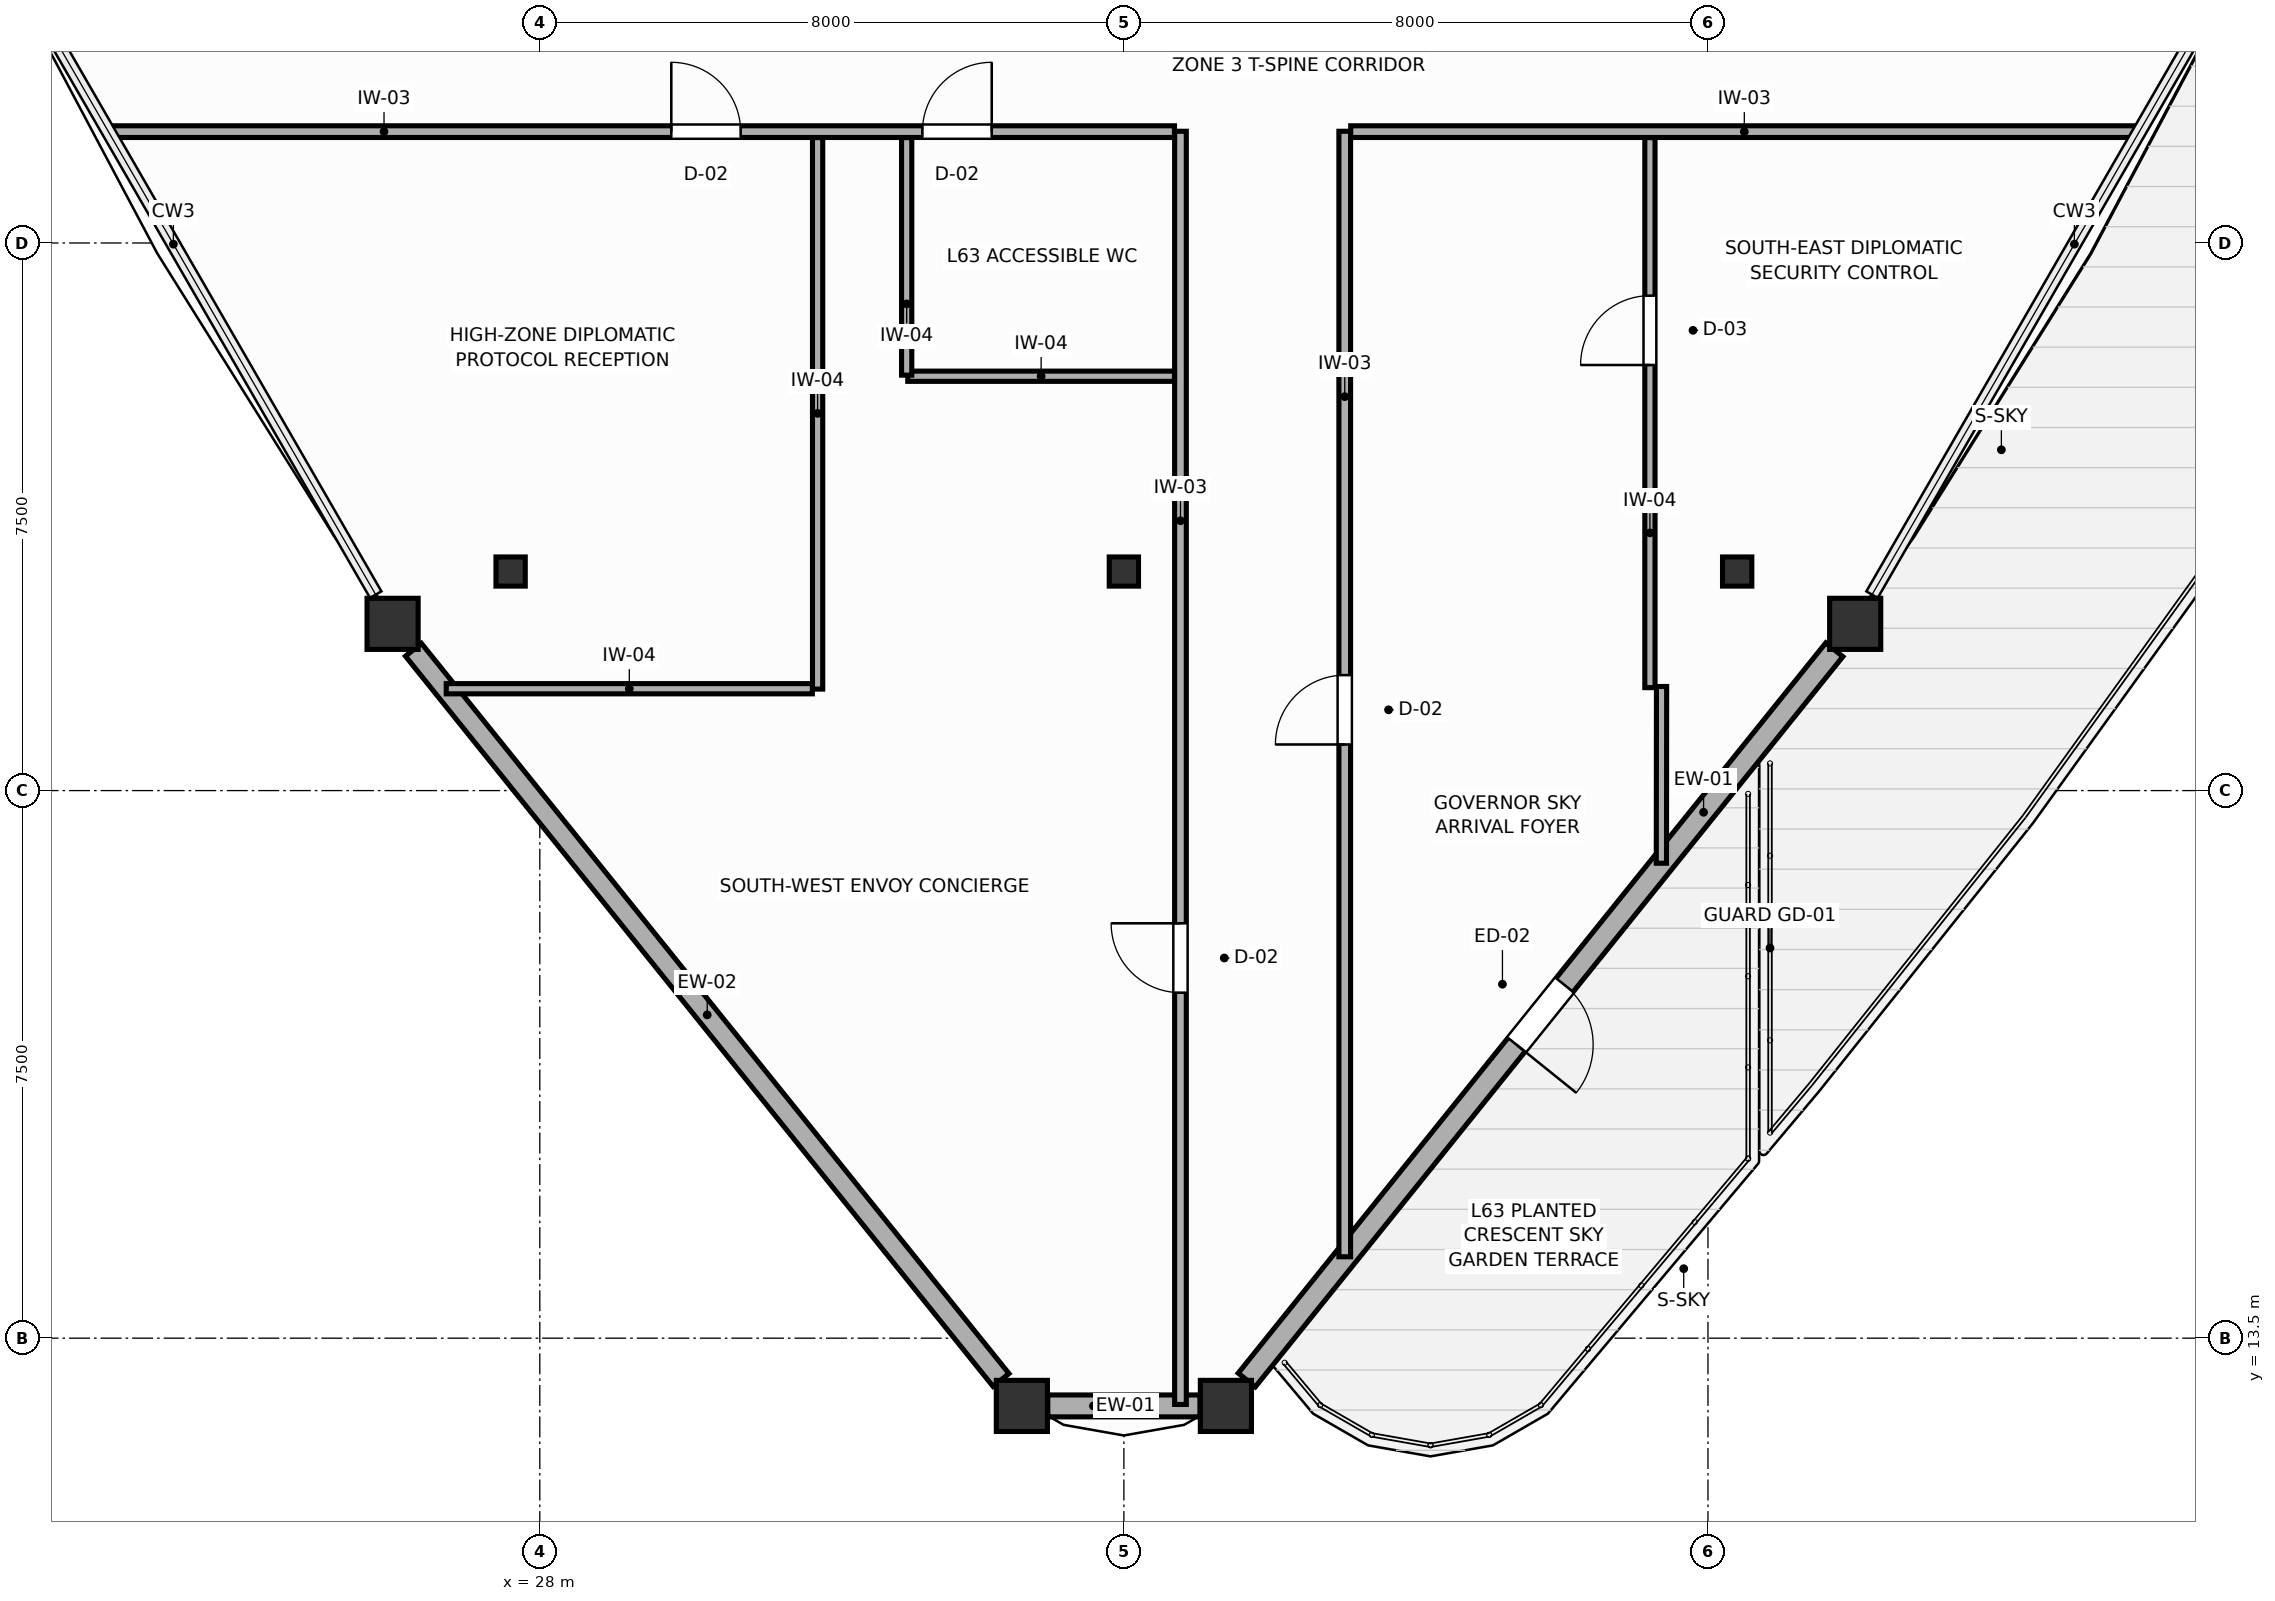
"""IFC4 building model, lengths in metres.
Left out: names, types, materials, properties, quantities, classifications, styles, units other than length and angle.
Written with IfcOpenShell. Run it as: python <this file> out.ifc"""

import sys

from ifc_helpers import new_model, si_unit, direction, frame, frame_2d, origin, origin_2d, place, context, subcontext, project, spatial, rectangle, i_section, extrude, source, transform, mapped, element, fill, save


model = new_model("IFC4")
c1 = context("Model", 3, precision=1e-05, world=origin(), true_north=direction((0.0, 1.0)))
c2 = subcontext(c1, "Body", "Model", "MODEL_VIEW")
j1 = project(units=[si_unit("LENGTHUNIT", "METRE"), si_unit("PLANEANGLEUNIT", "RADIAN")], contexts=[c1])
p1 = place(None, origin())
s1 = spatial("IfcSite", under=j1, at=p1, CompositionType="ELEMENT")
p2 = place(p1, origin())
s2 = spatial("IfcBuilding", under=s1, at=p2, CompositionType="ELEMENT")
p3 = place(p2, frame((0.0, 0.0, 243.0)))
s3 = spatial("IfcBuildingStorey", under=s2, at=p3, CompositionType="ELEMENT", Elevation=243.0)
m1 = source(origin(), c2, "Body", "SweptSolid", [
    extrude(i_section(OverallWidth=0.401, OverallDepth=0.399, WebThickness=0.022, FlangeThickness=0.036, FilletRadius=0.015, at=origin_2d()), origin(), (0.0, 0.0, 1.0), 3.6),
])
for number, where, z_axis, x_axis in (
    (1, (27.6, 24.0, 0.0), (0.0, 0.0, 1.0), (1.0, 0.0, 0.0)),
    (2, (44.4, 24.0, 0.0), (0.0, 0.0, 1.0), (1.0, 0.0, 0.0)),
    (3, (36.0, 24.0, 0.0), (0.0, 0.0, 1.0), (1.0, 0.0, 0.0)),
):
    element("IfcColumn", number, at=place(p3, frame(where, z_axis=z_axis, x_axis=x_axis)), inside=s3, PredefinedType="COLUMN", context=c2, shape_type="MappedRepresentation", body=[
        mapped(m1, transform((0.0, 0.0, 0.0), scale=1.0)),
    ])
m2 = source(origin(), c2, "Body", "SweptSolid", [
    extrude(rectangle(XDim=0.7, YDim=0.7, at=origin_2d()), origin(), (0.0, 0.0, 1.0), 3.6),
])
for number, where, z_axis, x_axis in (
    (4, (25.983, 23.284, 0.0), (0.0, 0.0, 1.0), (1.0, 0.0, 0.0)),
    (5, (34.603, 12.572, 0.0), (0.0, 0.0, 1.0), (1.0, 0.0, 0.0)),
    (6, (37.397, 12.572, 0.0), (0.0, 0.0, 1.0), (1.0, 0.0, 0.0)),
    (7, (46.017, 23.284, 0.0), (0.0, 0.0, 1.0), (1.0, 0.0, 0.0)),
):
    element("IfcColumn", number, at=place(p3, frame(where, z_axis=z_axis, x_axis=x_axis)), inside=s3, PredefinedType="COLUMN", context=c2, shape_type="MappedRepresentation", body=[
        mapped(m2, transform((0.0, 0.0, 0.0), scale=1.0)),
    ])
p4 = place(p3, frame((26.269, 22.929, 0.0), z_axis=(0.0, 0.0, 1.0), x_axis=(0.626898207352, -0.779101172903, 0.0)))
e8 = element("IfcWall", 8, at=p4, inside=s3, PredefinedType="SOLIDWALL", context=c2, shape_type="SweptSolid", body=[
    extrude(rectangle(XDim=12.837, YDim=0.28, at=frame_2d((6.418, 0.0))), origin(), (0.0, 0.0, 1.0), 3.08),
])
p5 = place(p3, frame((34.958, 12.572, 0.0), z_axis=(0.0, 0.0, 1.0), x_axis=(1.0, 0.0, 0.0)))
e9 = element("IfcWall", 9, at=p5, inside=s3, PredefinedType="SOLIDWALL", context=c2, shape_type="SweptSolid", body=[
    extrude(rectangle(XDim=2.085, YDim=0.3, at=frame_2d((1.042, 0.0))), origin(), (0.0, 0.0, 1.0), 3.08),
])
p6 = place(p3, frame((37.683, 12.927, 0.0), z_axis=(0.0, 0.0, 1.0), x_axis=(0.626898207352, 0.779101172903, 0.0)))
e10 = element("IfcWall", 10, at=p6, inside=s3, PredefinedType="SOLIDWALL", context=c2, shape_type="SweptSolid", body=[
    extrude(rectangle(XDim=12.837, YDim=0.3, at=frame_2d((6.418, 0.0))), origin(), (0.0, 0.0, 1.0), 3.05),
])
p7 = place(p6, frame((5.894, 0.0, 0.0)))
e11 = element("IfcOpeningElement", 11, at=p7, cuts=e10, PredefinedType="OPENING", context=c2, shape_type="SweptSolid", body=[
    extrude(rectangle(XDim=1.05, YDim=2.1, at=frame_2d((0.525, 1.05))), frame((0.0, 0.16, 0.0), z_axis=(0.0, -1.0, 0.0), x_axis=(1.0, 0.0, 0.0)), (0.0, 0.0, 1.0), 0.32),
])
p8 = place(p3, frame((36.775, 12.592, 0.0), z_axis=(0.0, 0.0, 1.0), x_axis=(0.0, 1.0, 0.0)))
e12 = element("IfcWall", 12, at=p8, inside=s3, PredefinedType="PARTITIONING", context=c2, shape_type="SweptSolid", body=[
    extrude(rectangle(XDim=17.438, YDim=0.16, at=frame_2d((8.719, 0.0))), origin(), (0.0, 0.0, 1.0), 3.41),
])
p9 = place(p8, frame((5.64, 0.0, 0.0)))
e13 = element("IfcOpeningElement", 13, at=p9, cuts=e12, PredefinedType="OPENING", context=c2, shape_type="SweptSolid", body=[
    extrude(rectangle(XDim=0.95, YDim=2.05, at=frame_2d((0.475, 1.025))), frame((0.0, 0.09, 0.0), z_axis=(0.0, -1.0, 0.0), x_axis=(1.0, 0.0, 0.0)), (0.0, 0.0, 1.0), 0.18),
])
p10 = place(p3, frame((39.025, 14.615, 0.0), z_axis=(0.0, 0.0, 1.0), x_axis=(0.0, 1.0, 0.0)))
e14 = element("IfcWall", 14, at=p10, inside=s3, PredefinedType="PARTITIONING", context=c2, shape_type="SweptSolid", body=[
    extrude(rectangle(XDim=15.415, YDim=0.16, at=frame_2d((7.708, 0.0))), origin(), (0.0, 0.0, 1.0), 3.41),
])
p11 = place(p10, frame((7.017, 0.0, 0.0)))
e15 = element("IfcOpeningElement", 15, at=p11, cuts=e14, PredefinedType="OPENING", context=c2, shape_type="SweptSolid", body=[
    extrude(rectangle(XDim=0.95, YDim=2.05, at=frame_2d((0.475, 1.025))), frame((0.0, 0.09, 0.0), z_axis=(0.0, -1.0, 0.0), x_axis=(1.0, 0.0, 0.0)), (0.0, 0.0, 1.0), 0.18),
])
p12 = place(p3, frame((22.111, 30.025, 0.0), z_axis=(0.0, 0.0, 1.0), x_axis=(1.0, 0.0, 0.0)))
e16 = element("IfcWall", 16, at=p12, inside=s3, PredefinedType="PARTITIONING", context=c2, shape_type="SweptSolid", body=[
    extrude(rectangle(XDim=14.582, YDim=0.16, at=frame_2d((7.291, 0.0))), origin(), (0.0, 0.0, 1.0), 3.41),
])
p13 = place(p12, frame((11.129, 0.0, 0.0)))
e17 = element("IfcOpeningElement", 17, at=p13, cuts=e16, PredefinedType="OPENING", context=c2, shape_type="SweptSolid", body=[
    extrude(rectangle(XDim=0.95, YDim=2.05, at=frame_2d((0.475, 1.025))), frame((0.0, 0.09, 0.0), z_axis=(0.0, -1.0, 0.0), x_axis=(1.0, 0.0, 0.0)), (0.0, 0.0, 1.0), 0.18),
])
p14 = place(p12, frame((7.69, 0.0, 0.0)))
e18 = element("IfcOpeningElement", 18, at=p14, cuts=e16, PredefinedType="OPENING", context=c2, shape_type="SweptSolid", body=[
    extrude(rectangle(XDim=0.95, YDim=2.05, at=frame_2d((0.475, 1.025))), frame((0.0, 0.09, 0.0), z_axis=(0.0, -1.0, 0.0), x_axis=(1.0, 0.0, 0.0)), (0.0, 0.0, 1.0), 0.18),
])
p15 = place(p3, frame((39.107, 30.025, 0.0), z_axis=(0.0, 0.0, 1.0), x_axis=(1.0, 0.0, 0.0)))
e19 = element("IfcWall", 19, at=p15, inside=s3, PredefinedType="PARTITIONING", context=c2, shape_type="SweptSolid", body=[
    extrude(rectangle(XDim=10.782, YDim=0.16, at=frame_2d((5.391, 0.0))), origin(), (0.0, 0.0, 1.0), 3.41),
])
p16 = place(p3, frame((31.805, 22.39, 0.0), z_axis=(0.0, 0.0, 1.0), x_axis=(0.0, 1.0, 0.0)))
e20 = element("IfcWall", 20, at=p16, inside=s3, PredefinedType="PARTITIONING", context=c2, shape_type="SweptSolid", body=[
    extrude(rectangle(XDim=7.553, YDim=0.14, at=frame_2d((3.777, 0.0))), origin(), (0.0, 0.0, 1.0), 3.41),
])
p17 = place(p3, frame((43.205, 22.41, 0.0), z_axis=(0.0, 0.0, 1.0), x_axis=(0.0, 1.0, 0.0)))
e21 = element("IfcWall", 21, at=p17, inside=s3, PredefinedType="PARTITIONING", context=c2, shape_type="SweptSolid", body=[
    extrude(rectangle(XDim=7.533, YDim=0.14, at=frame_2d((3.767, 0.0))), origin(), (0.0, 0.0, 1.0), 3.41),
])
p18 = place(p17, frame((4.419, 0.0, 0.0)))
e22 = element("IfcOpeningElement", 22, at=p18, cuts=e21, PredefinedType="OPENING", context=c2, shape_type="SweptSolid", body=[
    extrude(rectangle(XDim=0.95, YDim=2.05, at=frame_2d((0.475, 1.025))), frame((0.0, 0.08, 0.0), z_axis=(0.0, -1.0, 0.0), x_axis=(1.0, 0.0, 0.0)), (0.0, 0.0, 1.0), 0.16),
])
p19 = place(p3, frame((26.719, 22.395, 0.0), z_axis=(0.0, 0.0, 1.0), x_axis=(1.0, 0.0, 0.0)))
e23 = element("IfcWall", 23, at=p19, inside=s3, PredefinedType="PARTITIONING", context=c2, shape_type="SweptSolid", body=[
    extrude(rectangle(XDim=5.014, YDim=0.14, at=frame_2d((2.507, 0.0))), origin(), (0.0, 0.0, 1.0), 3.41),
])
p20 = place(p3, frame((33.04, 26.675, 0.0), z_axis=(0.0, 0.0, 1.0), x_axis=(1.0, 0.0, 0.0)))
e24 = element("IfcWall", 24, at=p20, inside=s3, PredefinedType="PARTITIONING", context=c2, shape_type="SweptSolid", body=[
    extrude(rectangle(XDim=3.653, YDim=0.14, at=frame_2d((1.827, 0.0))), origin(), (0.0, 0.0, 1.0), 3.41),
])
p21 = place(p3, frame((33.025, 26.69, 0.0), z_axis=(0.0, 0.0, 1.0), x_axis=(0.0, 1.0, 0.0)))
e25 = element("IfcWall", 25, at=p21, inside=s3, PredefinedType="PARTITIONING", context=c2, shape_type="SweptSolid", body=[
    extrude(rectangle(XDim=3.253, YDim=0.14, at=frame_2d((1.626, 0.0))), origin(), (0.0, 0.0, 1.0), 3.41),
])
p22 = place(p3, frame((43.362, 20.005, 0.0), z_axis=(0.0, 0.0, 1.0), x_axis=(0.000907715208, 0.999999588026, 0.0)))
e26 = element("IfcWall", 26, at=p22, inside=s3, PredefinedType="PARTITIONING", context=c2, shape_type="SweptSolid", body=[
    extrude(rectangle(XDim=2.421, YDim=0.14, at=frame_2d((1.21, 0.0))), origin(), (0.0, 0.0, 1.0), 3.41),
])
p23 = place(p7, frame((1.05, 0.0, 0.0), z_axis=(0.0, 0.0, 1.0), x_axis=(-1.0, 0.0, 0.0)))
e27 = element("IfcDoor", 27, at=p23, inside=s3, OperationType="SINGLE_SWING_RIGHT", PredefinedType="DOOR", context=c2, shape_type="SweptSolid", body=[
    extrude(rectangle(XDim=1.05, YDim=2.1, at=frame_2d((0.525, 1.05))), frame((0.0, 0.025, 0.0), z_axis=(0.0, -1.0, 0.0), x_axis=(1.0, 0.0, 0.0)), (0.0, 0.0, 1.0), 0.05),
])
fill(e11, e27)
p24 = place(p9, origin())
e28 = element("IfcDoor", 28, at=p24, inside=s3, OperationType="SINGLE_SWING_RIGHT", PredefinedType="DOOR", context=c2, shape_type="SweptSolid", body=[
    extrude(rectangle(XDim=0.95, YDim=2.05, at=frame_2d((0.475, 1.025))), frame((0.0, 0.025, 0.0), z_axis=(0.0, -1.0, 0.0), x_axis=(1.0, 0.0, 0.0)), (0.0, 0.0, 1.0), 0.05),
])
fill(e13, e28)
p25 = place(p11, origin())
e29 = element("IfcDoor", 29, at=p25, inside=s3, OperationType="SINGLE_SWING_LEFT", PredefinedType="DOOR", context=c2, shape_type="SweptSolid", body=[
    extrude(rectangle(XDim=0.95, YDim=2.05, at=frame_2d((0.475, 1.025))), frame((0.0, 0.025, 0.0), z_axis=(0.0, -1.0, 0.0), x_axis=(1.0, 0.0, 0.0)), (0.0, 0.0, 1.0), 0.05),
])
fill(e15, e29)
p26 = place(p13, origin())
e30 = element("IfcDoor", 30, at=p26, inside=s3, OperationType="SINGLE_SWING_RIGHT", PredefinedType="DOOR", context=c2, shape_type="SweptSolid", body=[
    extrude(rectangle(XDim=0.95, YDim=2.05, at=frame_2d((0.475, 1.025))), frame((0.0, 0.025, 0.0), z_axis=(0.0, -1.0, 0.0), x_axis=(1.0, 0.0, 0.0)), (0.0, 0.0, 1.0), 0.05),
])
fill(e17, e30)
p27 = place(p14, origin())
e31 = element("IfcDoor", 31, at=p27, inside=s3, OperationType="SINGLE_SWING_LEFT", PredefinedType="DOOR", context=c2, shape_type="SweptSolid", body=[
    extrude(rectangle(XDim=0.95, YDim=2.05, at=frame_2d((0.475, 1.025))), frame((0.0, 0.025, 0.0), z_axis=(0.0, -1.0, 0.0), x_axis=(1.0, 0.0, 0.0)), (0.0, 0.0, 1.0), 0.05),
])
fill(e18, e31)
p28 = place(p18, origin())
e32 = element("IfcDoor", 32, at=p28, inside=s3, OperationType="SINGLE_SWING_LEFT", PredefinedType="DOOR", context=c2, shape_type="SweptSolid", body=[
    extrude(rectangle(XDim=0.95, YDim=2.05, at=frame_2d((0.475, 1.025))), frame((0.0, 0.025, 0.0), z_axis=(0.0, -1.0, 0.0), x_axis=(1.0, 0.0, 0.0)), (0.0, 0.0, 1.0), 0.05),
])
fill(e22, e32)
save(model, sys.argv[1])
